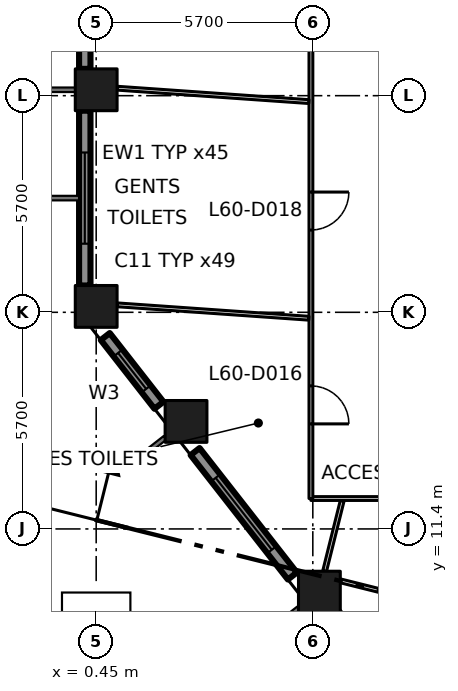
"""IFC4 building model, lengths in metres.
Left out: names, types, materials, properties, quantities, classifications, styles, units other than length and angle.
Written with IfcOpenShell. Run it as: python <this file> out.ifc"""

import sys

from ifc_helpers import new_model, si_unit, direction, frame, frame_2d, origin, origin_2d, place, context, subcontext, project, spatial, rectangle, extrude, element, fill, save


model = new_model("IFC4")
c1 = context("Model", 3, precision=1e-05, world=origin(), true_north=direction((0.0, 1.0)))
c2 = subcontext(c1, "Body", "Model", "MODEL_VIEW")
j1 = project(units=[si_unit("LENGTHUNIT", "METRE"), si_unit("PLANEANGLEUNIT", "RADIAN")], contexts=[c1])
p1 = place(None, origin())
s1 = spatial("IfcSite", under=j1, at=p1, CompositionType="ELEMENT")
p2 = place(p1, origin())
s2 = spatial("IfcBuilding", under=s1, at=p2, CompositionType="ELEMENT")
p3 = place(p2, frame((0.0, 0.0, 263.4)))
s3 = spatial("IfcBuildingStorey", under=s2, at=p3, CompositionType="ELEMENT", Elevation=263.4)
for number, where, z_axis, x_axis in (
    (1, (0.45, 17.255, 0.0), (0.0, 0.0, 1.0), (1.0, 0.0, 0.0)),
    (2, (0.45, 22.955, 0.0), (0.0, 0.0, 1.0), (1.0, 0.0, 0.0)),
    (3, (6.323, 9.737, 0.0), (0.0, 0.0, 1.0), (1.0, 0.0, 0.0)),
    (4, (2.814, 14.229, 0.0), (0.0, 0.0, 1.0), (1.0, 0.0, 0.0)),
):
    element("IfcColumn", number, at=place(p3, frame(where, z_axis=z_axis, x_axis=x_axis)), inside=s3, PredefinedType="COLUMN", context=c2, shape_type="SweptSolid", body=[
        extrude(rectangle(XDim=1.1, YDim=1.1, at=origin_2d()), origin(), (0.0, 0.0, 1.0), 4.2),
    ])
p4 = place(p3, frame((0.15, 28.105, 0.0), z_axis=(0.0, 0.0, 1.0), x_axis=(0.0, -1.0, 0.0)))
e5 = element("IfcWall", 5, at=p4, inside=s3, PredefinedType="SOLIDWALL", context=c2, shape_type="SweptSolid", body=[
    extrude(rectangle(XDim=4.6, YDim=0.3, at=frame_2d((2.3, 0.0))), origin(), (0.0, 0.0, 1.0), 3.15),
])
p5 = place(p4, frame((1.1, 0.0, 0.8)))
e6 = element("IfcOpeningElement", 6, at=p5, cuts=e5, PredefinedType="OPENING", context=c2, shape_type="SweptSolid", body=[
    extrude(rectangle(XDim=2.4, YDim=2.1, at=frame_2d((1.2, 1.05))), frame((0.0, 0.16, 0.0), z_axis=(0.0, -1.0, 0.0), x_axis=(1.0, 0.0, 0.0)), (0.0, 0.0, 1.0), 0.32),
])
p6 = place(p3, frame((0.15, 22.405, 0.0), z_axis=(0.0, 0.0, 1.0), x_axis=(0.0, -1.0, 0.0)))
e7 = element("IfcWall", 7, at=p6, inside=s3, PredefinedType="SOLIDWALL", context=c2, shape_type="SweptSolid", body=[
    extrude(rectangle(XDim=4.6, YDim=0.3, at=frame_2d((2.3, 0.0))), origin(), (0.0, 0.0, 1.0), 3.15),
])
p7 = place(p6, frame((1.1, 0.0, 0.8)))
e8 = element("IfcOpeningElement", 8, at=p7, cuts=e7, PredefinedType="OPENING", context=c2, shape_type="SweptSolid", body=[
    extrude(rectangle(XDim=2.4, YDim=2.1, at=frame_2d((1.2, 1.05))), frame((0.0, 0.16, 0.0), z_axis=(0.0, -1.0, 0.0), x_axis=(1.0, 0.0, 0.0)), (0.0, 0.0, 1.0), 0.32),
])
p8 = place(p3, frame((0.689, 16.462, 0.0), z_axis=(0.0, 0.0, 1.0), x_axis=(0.615625465473, -0.788038886262, 0.0)))
e9 = element("IfcWall", 9, at=p8, inside=s3, PredefinedType="SOLIDWALL", context=c2, shape_type="SweptSolid", body=[
    extrude(rectangle(XDim=2.295, YDim=0.3, at=frame_2d((1.148, 0.0))), origin(), (0.0, 0.0, 1.0), 3.15),
])
p9 = place(p8, frame((0.548, 0.0, 0.8)))
e10 = element("IfcOpeningElement", 10, at=p9, cuts=e9, PredefinedType="OPENING", context=c2, shape_type="SweptSolid", body=[
    extrude(rectangle(XDim=1.2, YDim=2.1, at=frame_2d((0.6, 1.05))), frame((0.0, 0.16, 0.0), z_axis=(0.0, -1.0, 0.0), x_axis=(1.0, 0.0, 0.0)), (0.0, 0.0, 1.0), 0.32),
])
p10 = place(p3, frame((3.053, 13.436, 0.0), z_axis=(0.0, 0.0, 1.0), x_axis=(0.615699893917, -0.787980736205, 0.0)))
e11 = element("IfcWall", 11, at=p10, inside=s3, PredefinedType="SOLIDWALL", context=c2, shape_type="SweptSolid", body=[
    extrude(rectangle(XDim=4.156, YDim=0.3, at=frame_2d((2.078, 0.0))), origin(), (0.0, 0.0, 1.0), 3.15),
])
p11 = place(p10, frame((0.878, 0.0, 0.8)))
e12 = element("IfcOpeningElement", 12, at=p11, cuts=e11, PredefinedType="OPENING", context=c2, shape_type="SweptSolid", body=[
    extrude(rectangle(XDim=2.4, YDim=2.1, at=frame_2d((1.2, 1.05))), frame((0.0, 0.16, 0.0), z_axis=(0.0, -1.0, 0.0), x_axis=(1.0, 0.0, 0.0)), (0.0, 0.0, 1.0), 0.32),
])
p12 = place(p3, frame((6.754, 9.187, 0.0), z_axis=(0.0, 0.0, 1.0), x_axis=(0.615514142447, -0.78812584049, 0.0)))
e13 = element("IfcWall", 13, at=p12, inside=s3, PredefinedType="SOLIDWALL", context=c2, shape_type="SweptSolid", body=[
    extrude(rectangle(XDim=4.304, YDim=0.2, at=frame_2d((2.152, 0.0))), origin(), (0.0, 0.0, 1.0), 3.15),
])
p13 = place(p12, frame((1.252, 0.0, 0.0)))
e14 = element("IfcOpeningElement", 14, at=p13, cuts=e13, PredefinedType="OPENING", context=c2, shape_type="SweptSolid", body=[
    extrude(rectangle(XDim=1.8, YDim=2.9, at=frame_2d((0.9, 1.45))), frame((0.0, 0.11, 0.0), z_axis=(0.0, -1.0, 0.0), x_axis=(1.0, 0.0, 0.0)), (0.0, 0.0, 1.0), 0.22),
])
p14 = place(p3, frame((6.1, 12.2, 0.0), z_axis=(0.0, 0.0, 1.0), x_axis=(1.0, 0.0, 0.0)))
e15 = element("IfcWall", 15, at=p14, inside=s3, PredefinedType="PARTITIONING", context=c2, shape_type="SweptSolid", body=[
    extrude(rectangle(XDim=3.8, YDim=0.1, at=frame_2d((1.9, 0.0))), origin(), (0.0, 0.0, 1.0), 3.9),
])
p15 = place(p3, frame((6.1, 38.9, 0.0), z_axis=(0.0, 0.0, 1.0), x_axis=(0.0, -1.0, 0.0)))
e16 = element("IfcWall", 16, at=p15, inside=s3, PredefinedType="PARTITIONING", context=c2, shape_type="SweptSolid", body=[
    extrude(rectangle(XDim=26.7, YDim=0.1, at=frame_2d((13.35, 0.0))), origin(), (0.0, 0.0, 1.0), 3.9),
])
p16 = place(p15, frame((23.736, 0.0, 0.0)))
e17 = element("IfcOpeningElement", 17, at=p16, cuts=e16, PredefinedType="OPENING", context=c2, shape_type="SweptSolid", body=[
    extrude(rectangle(XDim=1.0, YDim=2.1, at=frame_2d((0.5, 1.05))), frame((0.0, 0.06, 0.0), z_axis=(0.0, -1.0, 0.0), x_axis=(1.0, 0.0, 0.0)), (0.0, 0.0, 1.0), 0.12),
])
p17 = place(p15, frame((18.636, 0.0, 0.0)))
e18 = element("IfcOpeningElement", 18, at=p17, cuts=e16, PredefinedType="OPENING", context=c2, shape_type="SweptSolid", body=[
    extrude(rectangle(XDim=1.0, YDim=2.1, at=frame_2d((0.5, 1.05))), frame((0.0, 0.06, 0.0), z_axis=(0.0, -1.0, 0.0), x_axis=(1.0, 0.0, 0.0)), (0.0, 0.0, 1.0), 0.12),
])
p18 = place(p15, frame((10.436, 0.0, 0.0)))
e19 = element("IfcOpeningElement", 19, at=p18, cuts=e16, PredefinedType="OPENING", context=c2, shape_type="SweptSolid", body=[
    extrude(rectangle(XDim=1.0, YDim=2.1, at=frame_2d((0.5, 1.05))), frame((0.0, 0.06, 0.0), z_axis=(0.0, -1.0, 0.0), x_axis=(1.0, 0.0, 0.0)), (0.0, 0.0, 1.0), 0.12),
])
p19 = place(p15, frame((1.38, 0.0, 0.0)))
e20 = element("IfcOpeningElement", 20, at=p19, cuts=e16, PredefinedType="OPENING", context=c2, shape_type="SweptSolid", body=[
    extrude(rectangle(XDim=1.8, YDim=2.1, at=frame_2d((0.9, 1.05))), frame((0.0, 0.06, 0.0), z_axis=(0.0, -1.0, 0.0), x_axis=(1.0, 0.0, 0.0)), (0.0, 0.0, 1.0), 0.12),
])
for number, where, z_axis, x_axis in (
    (21, (6.047, 16.944, 0.0), (0.0, 0.0, 1.0), (-0.998, 0.07, 0.0)),
    (22, (6.047, 22.644, 0.0), (0.0, 0.0, 1.0), (-0.998, 0.07, 0.0)),
):
    element("IfcWall", number, at=place(p3, frame(where, z_axis=z_axis, x_axis=x_axis)), inside=s3, PredefinedType="PARTITIONING", context=c2, shape_type="SweptSolid", body=[
        extrude(rectangle(XDim=5.06, YDim=0.1, at=frame_2d((2.53, 0.0))), origin(), (0.0, 0.0, 1.0), 3.9),
    ])
p20 = place(p3, frame((6.922, 12.138, 0.0), z_axis=(0.0, 0.0, 1.0), x_axis=(-0.242264600824, -0.970210215978, 0.0)))
e23 = element("IfcWall", 23, at=p20, inside=s3, PredefinedType="PARTITIONING", context=c2, shape_type="SweptSolid", body=[
    extrude(rectangle(XDim=1.908, YDim=0.1, at=frame_2d((0.954, 0.0))), origin(), (0.0, 0.0, 1.0), 3.9),
])
p21 = place(p3, frame((8.72, 9.574, 0.0), z_axis=(0.0, 0.0, 1.0), x_axis=(-0.970240497311, 0.242143299263, 0.0)))
e24 = element("IfcWall", 24, at=p21, inside=s3, PredefinedType="PARTITIONING", context=c2, shape_type="SweptSolid", body=[
    extrude(rectangle(XDim=1.904, YDim=0.1, at=frame_2d((0.952, 0.0))), origin(), (0.0, 0.0, 1.0), 3.9),
])
p22 = place(p7, origin())
e25 = element("IfcWindow", 25, at=p22, inside=s3, PartitioningType="DOUBLE_PANEL_VERTICAL", PredefinedType="WINDOW", context=c2, shape_type="SweptSolid", body=[
    extrude(rectangle(XDim=2.4, YDim=2.1, at=frame_2d((1.2, 1.05))), frame((0.0, 0.03, 0.0), z_axis=(0.0, -1.0, 0.0), x_axis=(1.0, 0.0, 0.0)), (0.0, 0.0, 1.0), 0.06),
])
fill(e8, e25)
p23 = place(p9, origin())
e26 = element("IfcWindow", 26, at=p23, inside=s3, PartitioningType="SINGLE_PANEL", PredefinedType="WINDOW", context=c2, shape_type="SweptSolid", body=[
    extrude(rectangle(XDim=1.2, YDim=2.1, at=frame_2d((0.6, 1.05))), frame((0.0, 0.03, 0.0), z_axis=(0.0, -1.0, 0.0), x_axis=(1.0, 0.0, 0.0)), (0.0, 0.0, 1.0), 0.06),
])
fill(e10, e26)
p24 = place(p11, origin())
e27 = element("IfcWindow", 27, at=p24, inside=s3, PartitioningType="DOUBLE_PANEL_VERTICAL", PredefinedType="WINDOW", context=c2, shape_type="SweptSolid", body=[
    extrude(rectangle(XDim=2.4, YDim=2.1, at=frame_2d((1.2, 1.05))), frame((0.0, 0.03, 0.0), z_axis=(0.0, -1.0, 0.0), x_axis=(1.0, 0.0, 0.0)), (0.0, 0.0, 1.0), 0.06),
])
fill(e12, e27)
p25 = place(p16, origin())
e28 = element("IfcDoor", 28, at=p25, inside=s3, OperationType="SINGLE_SWING_RIGHT", PredefinedType="DOOR", context=c2, shape_type="SweptSolid", body=[
    extrude(rectangle(XDim=1.0, YDim=2.1, at=frame_2d((0.5, 1.05))), frame((0.0, 0.025, 0.0), z_axis=(0.0, -1.0, 0.0), x_axis=(1.0, 0.0, 0.0)), (0.0, 0.0, 1.0), 0.05),
])
fill(e17, e28)
p26 = place(p17, origin())
e29 = element("IfcDoor", 29, at=p26, inside=s3, OperationType="SINGLE_SWING_LEFT", PredefinedType="DOOR", context=c2, shape_type="SweptSolid", body=[
    extrude(rectangle(XDim=1.0, YDim=2.1, at=frame_2d((0.5, 1.05))), frame((0.0, 0.025, 0.0), z_axis=(0.0, -1.0, 0.0), x_axis=(1.0, 0.0, 0.0)), (0.0, 0.0, 1.0), 0.05),
])
fill(e18, e29)
save(model, sys.argv[1])
